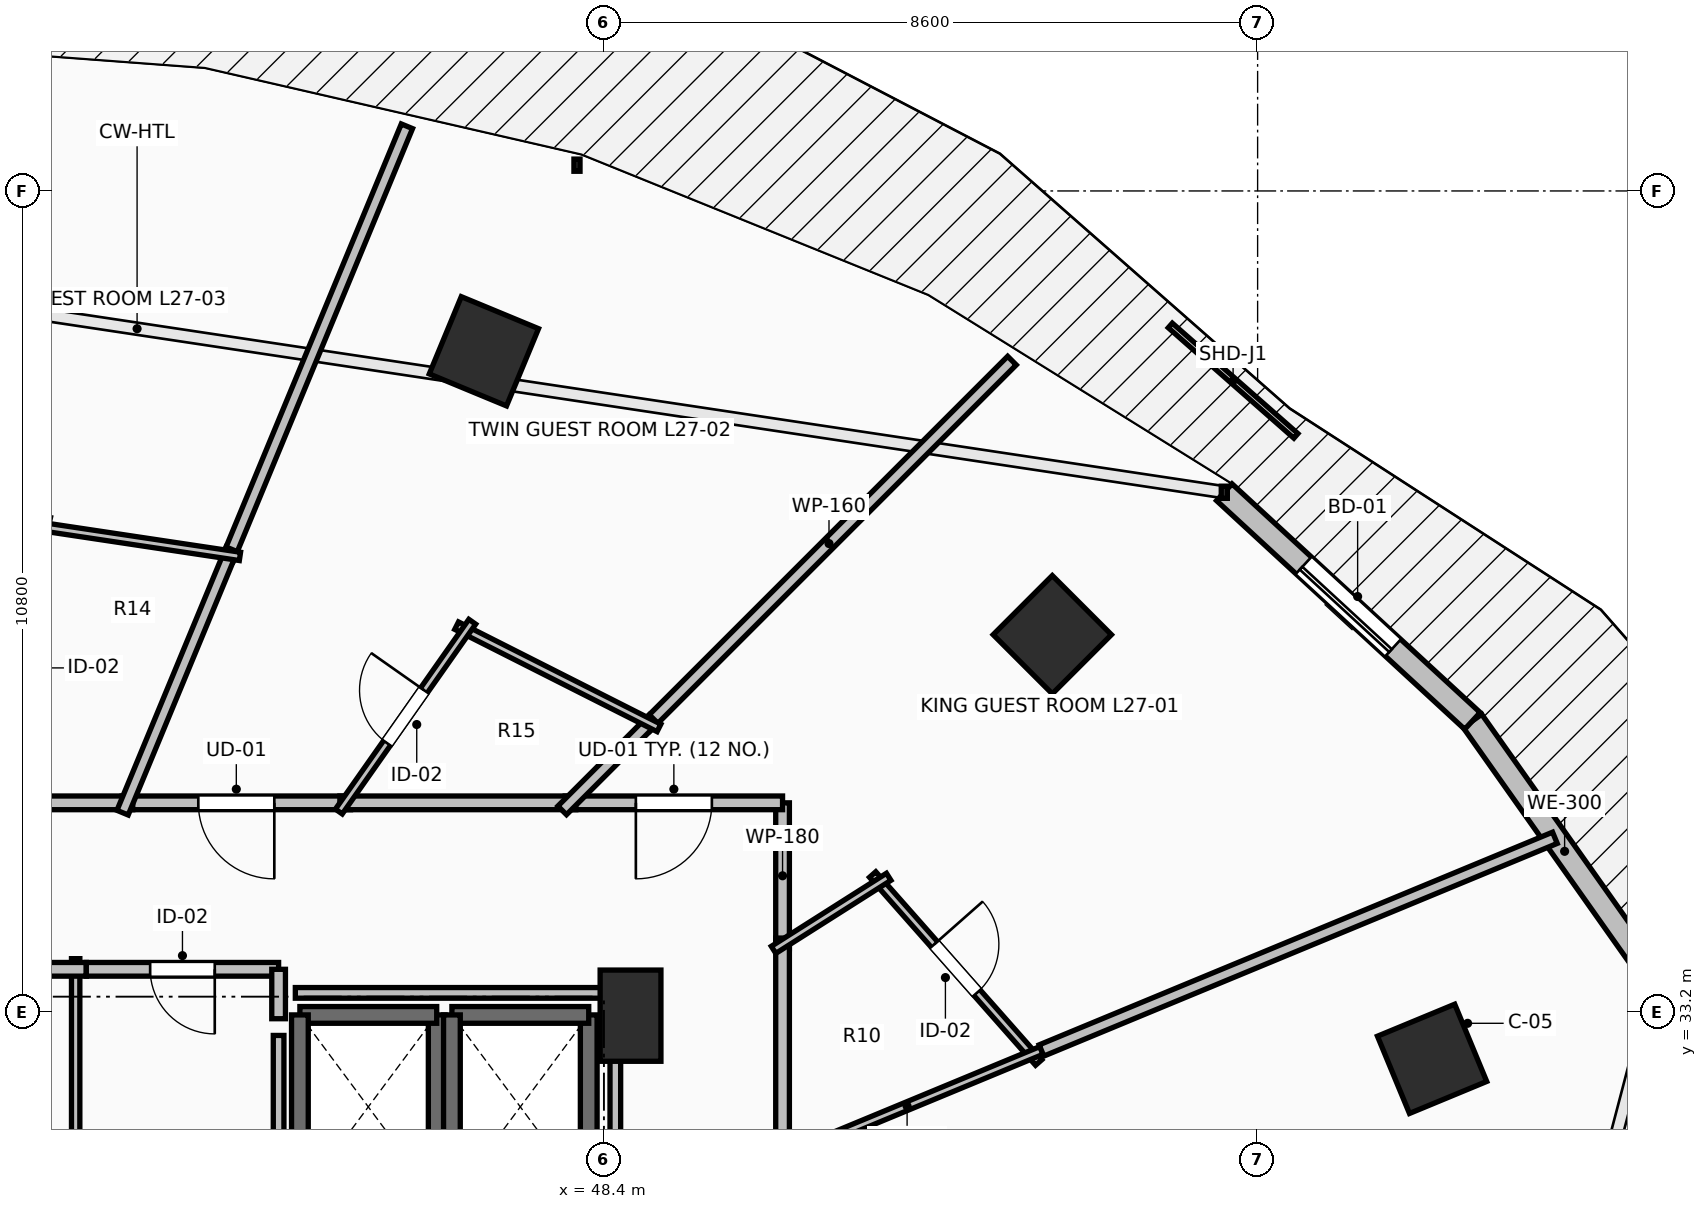
"""IFC4 building model, lengths in metres.
Left out: names, types, materials, properties, quantities, classifications, styles, units other than length and angle.
Written with IfcOpenShell. Run it as: python <this file> out.ifc"""

import sys

from ifc_helpers import new_model, si_unit, direction, frame, frame_2d, origin, origin_2d, place, context, subcontext, project, spatial, rectangle, extrude, element, fill, save


model = new_model("IFC4")
c1 = context("Model", 3, precision=1e-05, world=origin(), true_north=direction((0.0, 1.0)))
c2 = subcontext(c1, "Body", "Model", "MODEL_VIEW")
j1 = project(units=[si_unit("LENGTHUNIT", "METRE"), si_unit("PLANEANGLEUNIT", "RADIAN")], contexts=[c1])
p1 = place(None, origin())
s1 = spatial("IfcSite", under=j1, at=p1, CompositionType="ELEMENT")
p2 = place(p1, origin())
s2 = spatial("IfcBuilding", under=s1, at=p2, CompositionType="ELEMENT")
p3 = place(p2, frame((0.0, 0.0, 103.3)))
s3 = spatial("IfcBuildingStorey", under=s2, at=p3, CompositionType="ELEMENT", Elevation=103.3)
for number, where, z_axis, x_axis in (
    (1, (59.295, 32.582, 0.0), (0.0, 0.0, 1.0), (0.924, 0.383, 0.0)),
    (2, (54.299, 38.162, 0.0), (0.0, 0.0, 1.0), (0.707, 0.707, 0.0)),
    (3, (46.821, 41.891, 0.0), (0.0, 0.0, 1.0), (0.383, 0.924, 0.0)),
):
    element("IfcColumn", number, at=place(p3, frame(where, z_axis=z_axis, x_axis=x_axis)), inside=s3, PredefinedType="COLUMN", context=c2, shape_type="SweptSolid", body=[
        extrude(rectangle(XDim=1.1, YDim=1.1, at=origin_2d()), origin(), (0.0, 0.0, 1.0), 3.5),
    ])
p4 = place(p3, frame((48.75, 33.15, 0.0), z_axis=(0.0, 0.0, 1.0), x_axis=(1.0, 0.0, 0.0)))
e4 = element("IfcColumn", 4, at=p4, inside=s3, PredefinedType="PILASTER", context=c2, shape_type="SweptSolid", body=[
    extrude(rectangle(XDim=0.8, YDim=1.2, at=origin_2d()), origin(), (0.0, 0.0, 1.0), 3.5),
])
p5 = place(p3, frame((62.252, 33.596, 0.0), z_axis=(0.0, 0.0, 1.0), x_axis=(-0.57716435238, 0.81662801222, 0.0)))
e5 = element("IfcWall", 5, at=p5, inside=s3, PredefinedType="STANDARD", context=c2, shape_type="SweptSolid", body=[
    extrude(rectangle(XDim=4.202, YDim=0.3, at=frame_2d((2.101, 0.0))), origin(), (0.0, 0.0, 1.0), 3.24),
])
p6 = place(p3, frame((59.826, 37.028, 0.0), z_axis=(0.0, 0.0, 1.0), x_axis=(-0.735416718093, 0.677615119924, 0.0)))
e6 = element("IfcWall", 6, at=p6, inside=s3, PredefinedType="STANDARD", context=c2, shape_type="SweptSolid", body=[
    extrude(rectangle(XDim=4.439, YDim=0.3, at=frame_2d((2.22, 0.0))), origin(), (0.0, 0.0, 1.0), 3.24),
])
p7 = place(p6, frame((1.419, 0.0, 0.0)))
e7 = element("IfcOpeningElement", 7, at=p7, cuts=e6, PredefinedType="OPENING", context=c2, shape_type="SweptSolid", body=[
    extrude(rectangle(XDim=1.6, YDim=2.3, at=frame_2d((0.8, 1.15))), frame((0.0, 0.165, 0.0), z_axis=(0.0, -1.0, 0.0), x_axis=(1.0, 0.0, 0.0)), (0.0, 0.0, 1.0), 0.33),
])
p8 = place(p3, frame((46.2, 30.74, 0.0), z_axis=(0.0, 0.0, 1.0), x_axis=(0.0, 1.0, 0.0)))
e8 = element("IfcWall", 8, at=p8, inside=s3, PredefinedType="SOLIDWALL", context=c2, shape_type="SweptSolid", body=[
    extrude(rectangle(XDim=2.42, YDim=0.22, at=frame_2d((1.21, 0.0))), origin(), (0.0, 0.0, 1.0), 3.24),
])
p9 = place(p3, frame((46.2, 33.16, 0.0), z_axis=(0.0, 0.0, 1.0), x_axis=(-1.0, 0.0, 0.0)))
e9 = element("IfcWall", 9, at=p9, inside=s3, PredefinedType="SOLIDWALL", context=c2, shape_type="SweptSolid", body=[
    extrude(rectangle(XDim=1.8, YDim=0.22, at=frame_2d((0.9, 0.0))), origin(), (0.0, 0.0, 1.0), 3.24),
])
for number, where, z_axis, x_axis in (
    (10, (44.4, 33.16, 0.0), (0.0, 0.0, 1.0), (0.0, -1.0, 0.0)),
    (11, (48.2, 30.74, 0.0), (0.0, 0.0, 1.0), (0.0, 1.0, 0.0)),
):
    element("IfcWall", number, at=place(p3, frame(where, z_axis=z_axis, x_axis=x_axis)), inside=s3, PredefinedType="SOLIDWALL", context=c2, shape_type="SweptSolid", body=[
        extrude(rectangle(XDim=2.42, YDim=0.22, at=frame_2d((1.21, 0.0))), origin(), (0.0, 0.0, 1.0), 3.24),
    ])
p10 = place(p3, frame((48.2, 33.16, 0.0), z_axis=(0.0, 0.0, 1.0), x_axis=(-1.0, 0.0, 0.0)))
e12 = element("IfcWall", 12, at=p10, inside=s3, PredefinedType="SOLIDWALL", context=c2, shape_type="SweptSolid", body=[
    extrude(rectangle(XDim=1.8, YDim=0.22, at=frame_2d((0.9, 0.0))), origin(), (0.0, 0.0, 1.0), 3.24),
])
p11 = place(p3, frame((46.4, 33.16, 0.0), z_axis=(0.0, 0.0, 1.0), x_axis=(0.0, -1.0, 0.0)))
e13 = element("IfcWall", 13, at=p11, inside=s3, PredefinedType="SOLIDWALL", context=c2, shape_type="SweptSolid", body=[
    extrude(rectangle(XDim=2.42, YDim=0.22, at=frame_2d((1.21, 0.0))), origin(), (0.0, 0.0, 1.0), 3.24),
])
p12 = place(p3, frame((41.45, 30.34, 0.0), z_axis=(0.0, 0.0, 1.0), x_axis=(0.0, 1.0, 0.0)))
e14 = element("IfcWall", 14, at=p12, inside=s3, PredefinedType="PARTITIONING", context=c2, shape_type="SweptSolid", body=[
    extrude(rectangle(XDim=3.56, YDim=0.11, at=frame_2d((1.78, 0.0))), origin(), (0.0, 0.0, 1.0), 3.24),
])
p13 = place(p3, frame((41.59, 33.76, 0.0), z_axis=(0.0, 0.0, 1.0), x_axis=(-1.0, 0.0, 0.0)))
e15 = element("IfcWall", 15, at=p13, inside=s3, PredefinedType="PARTITIONING", context=c2, shape_type="SweptSolid", body=[
    extrude(rectangle(XDim=3.44, YDim=0.18, at=frame_2d((1.72, 0.0))), origin(), (0.0, 0.0, 1.0), 3.24),
])
p14 = place(p13, frame((1.295, 0.0, 0.0)))
e16 = element("IfcOpeningElement", 16, at=p14, cuts=e15, PredefinedType="OPENING", context=c2, shape_type="SweptSolid", body=[
    extrude(rectangle(XDim=0.85, YDim=2.1, at=frame_2d((0.425, 1.05))), frame((0.0, 0.105, 0.0), z_axis=(0.0, -1.0, 0.0), x_axis=(1.0, 0.0, 0.0)), (0.0, 0.0, 1.0), 0.21),
])
p15 = place(p3, frame((44.12, 33.76, 0.0), z_axis=(0.0, 0.0, 1.0), x_axis=(-1.0, 0.0, 0.0)))
e17 = element("IfcWall", 17, at=p15, inside=s3, PredefinedType="PARTITIONING", context=c2, shape_type="SweptSolid", body=[
    extrude(rectangle(XDim=2.53, YDim=0.18, at=frame_2d((1.265, 0.0))), origin(), (0.0, 0.0, 1.0), 3.24),
])
p16 = place(p15, frame((0.84, 0.0, 0.0)))
e18 = element("IfcOpeningElement", 18, at=p16, cuts=e17, PredefinedType="OPENING", context=c2, shape_type="SweptSolid", body=[
    extrude(rectangle(XDim=0.85, YDim=2.1, at=frame_2d((0.425, 1.05))), frame((0.0, 0.105, 0.0), z_axis=(0.0, -1.0, 0.0), x_axis=(1.0, 0.0, 0.0)), (0.0, 0.0, 1.0), 0.21),
])
p17 = place(p3, frame((44.12, 33.11, 0.0), z_axis=(0.0, 0.0, 1.0), x_axis=(0.0, 1.0, 0.0)))
e19 = element("IfcWall", 19, at=p17, inside=s3, PredefinedType="PARTITIONING", context=c2, shape_type="SweptSolid", body=[
    extrude(rectangle(XDim=0.65, YDim=0.18, at=frame_2d((0.325, 0.0))), origin(), (0.0, 0.0, 1.0), 3.24),
])
p18 = place(p3, frame((50.75, 34.031, 0.0), z_axis=(0.0, 0.0, 1.0), x_axis=(0.0, 1.0, 0.0)))
e20 = element("IfcWall", 20, at=p18, inside=s3, PredefinedType="PARTITIONING", context=c2, shape_type="SweptSolid", body=[
    extrude(rectangle(XDim=1.919, YDim=0.18, at=frame_2d((0.959, 0.0))), origin(), (0.0, 0.0, 1.0), 2.432),
])
p19 = place(p3, frame((50.75, 35.95, 0.0), z_axis=(0.0, 0.0, 1.0), x_axis=(-1.0, 0.0, 0.0)))
e21 = element("IfcWall", 21, at=p19, inside=s3, PredefinedType="PARTITIONING", context=c2, shape_type="SweptSolid", body=[
    extrude(rectangle(XDim=2.86, YDim=0.18, at=frame_2d((1.43, 0.0))), origin(), (0.0, 0.0, 1.0), 2.432),
])
p20 = place(p19, frame((0.93, 0.0, 0.0)))
e22 = element("IfcOpeningElement", 22, at=p20, cuts=e21, PredefinedType="OPENING", context=c2, shape_type="SweptSolid", body=[
    extrude(rectangle(XDim=1.0, YDim=2.15, at=frame_2d((0.5, 1.075))), frame((0.0, 0.105, 0.0), z_axis=(0.0, -1.0, 0.0), x_axis=(1.0, 0.0, 0.0)), (0.0, 0.0, 1.0), 0.21),
])
p21 = place(p3, frame((50.75, 31.081, 0.0), z_axis=(0.0, 0.0, 1.0), x_axis=(0.0, 1.0, 0.0)))
e23 = element("IfcWall", 23, at=p21, inside=s3, PredefinedType="PARTITIONING", context=c2, shape_type="SweptSolid", body=[
    extrude(rectangle(XDim=3.09, YDim=0.18, at=frame_2d((1.545, 0.0))), origin(), (0.0, 0.0, 1.0), 2.432),
])
p22 = place(p3, frame((45.066, 35.95, 0.0), z_axis=(0.0, 0.0, 1.0), x_axis=(-1.0, 0.0, 0.0)))
e24 = element("IfcWall", 24, at=p22, inside=s3, PredefinedType="PARTITIONING", context=c2, shape_type="SweptSolid", body=[
    extrude(rectangle(XDim=3.005, YDim=0.18, at=frame_2d((1.502, 0.0))), origin(), (0.0, 0.0, 1.0), 3.24),
])
p23 = place(p22, frame((1.002, 0.0, 0.0)))
e25 = element("IfcOpeningElement", 25, at=p23, cuts=e24, PredefinedType="OPENING", context=c2, shape_type="SweptSolid", body=[
    extrude(rectangle(XDim=1.0, YDim=2.15, at=frame_2d((0.5, 1.075))), frame((0.0, 0.105, 0.0), z_axis=(0.0, -1.0, 0.0), x_axis=(1.0, 0.0, 0.0)), (0.0, 0.0, 1.0), 0.21),
])
p24 = place(p3, frame((48.03, 35.95, 0.0), z_axis=(0.0, 0.0, 1.0), x_axis=(-1.0, 0.0, 0.0)))
e26 = element("IfcWall", 26, at=p24, inside=s3, PredefinedType="PARTITIONING", context=c2, shape_type="SweptSolid", body=[
    extrude(rectangle(XDim=3.104, YDim=0.18, at=frame_2d((1.552, 0.0))), origin(), (0.0, 0.0, 1.0), 2.432),
])
p25 = place(p3, frame((42.201, 35.95, 0.0), z_axis=(0.0, 0.0, 1.0), x_axis=(-1.0, 0.0, 0.0)))
e27 = element("IfcWall", 27, at=p25, inside=s3, PredefinedType="PARTITIONING", context=c2, shape_type="SweptSolid", body=[
    extrude(rectangle(XDim=2.056, YDim=0.18, at=frame_2d((1.028, 0.0))), origin(), (0.0, 0.0, 1.0), 3.24),
])
p26 = place(p3, frame((51.935, 35.007, 0.0), z_axis=(0.0, 0.0, 1.0), x_axis=(0.662059609276, -0.749451181709, 0.0)))
e28 = element("IfcWall", 28, at=p26, inside=s3, PredefinedType="PARTITIONING", context=c2, shape_type="SweptSolid", body=[
    extrude(rectangle(XDim=3.299, YDim=0.11, at=frame_2d((1.65, 0.0))), origin(), (0.0, 0.0, 1.0), 2.432),
])
p27 = place(p26, frame((1.225, 0.0, 0.0)))
e29 = element("IfcOpeningElement", 29, at=p27, cuts=e28, PredefinedType="OPENING", context=c2, shape_type="SweptSolid", body=[
    extrude(rectangle(XDim=0.85, YDim=2.1, at=frame_2d((0.425, 1.05))), frame((0.0, 0.07, 0.0), z_axis=(0.0, -1.0, 0.0), x_axis=(1.0, 0.0, 0.0)), (0.0, 0.0, 1.0), 0.14),
])
p28 = place(p3, frame((54.156, 32.693, 0.0), z_axis=(0.0, 0.0, 1.0), x_axis=(-0.923803754276, -0.382866326002, 0.0)))
e30 = element("IfcWall", 30, at=p28, inside=s3, PredefinedType="PARTITIONING", context=c2, shape_type="SweptSolid", body=[
    extrude(rectangle(XDim=3.827, YDim=0.11, at=frame_2d((1.914, 0.0))), origin(), (0.0, 0.0, 1.0), 2.432),
])
p29 = place(p3, frame((50.632, 34.016, 0.0), z_axis=(0.0, 0.0, 1.0), x_axis=(0.844361394482, 0.535774052665, 0.0)))
e31 = element("IfcWall", 31, at=p29, inside=s3, PredefinedType="PARTITIONING", context=c2, shape_type="SweptSolid", body=[
    extrude(rectangle(XDim=1.793, YDim=0.11, at=frame_2d((0.897, 0.0))), origin(), (0.0, 0.0, 1.0), 2.886),
])
p30 = place(p3, frame((53.768, 41.768, 0.0), z_axis=(0.0, 0.0, 1.0), x_axis=(-0.707106781187, -0.707106781187, 0.0)))
e32 = element("IfcWall", 32, at=p30, inside=s3, PredefinedType="PARTITIONING", context=c2, shape_type="SweptSolid", body=[
    extrude(rectangle(XDim=6.808, YDim=0.16, at=frame_2d((3.404, 0.0))), origin(), (0.0, 0.0, 1.0), 2.677),
])
p31 = place(p3, frame((49.053, 37.053, 0.0), z_axis=(0.0, 0.0, 1.0), x_axis=(-0.707106781187, -0.707106781187, 0.0)))
e33 = element("IfcWall", 33, at=p31, inside=s3, PredefinedType="PARTITIONING", context=c2, shape_type="SweptSolid", body=[
    extrude(rectangle(XDim=1.7, YDim=0.16, at=frame_2d((0.85, 0.0))), origin(), (0.0, 0.0, 1.0), 2.432),
])
p32 = place(p3, frame((54.156, 32.692, 0.0), z_axis=(0.0, 0.0, 1.0), x_axis=(0.923875192571, 0.38269390974, 0.0)))
e34 = element("IfcWall", 34, at=p32, inside=s3, PredefinedType="PARTITIONING", context=c2, shape_type="SweptSolid", body=[
    extrude(rectangle(XDim=7.311, YDim=0.16, at=frame_2d((3.656, 0.0))), origin(), (0.0, 0.0, 1.0), 2.432),
])
p33 = place(p3, frame((46.462, 38.281, 0.0), z_axis=(0.0, 0.0, 1.0), x_axis=(0.892486842203, -0.451073426944, 0.0)))
e35 = element("IfcWall", 35, at=p33, inside=s3, PredefinedType="PARTITIONING", context=c2, shape_type="SweptSolid", body=[
    extrude(rectangle(XDim=2.982, YDim=0.11, at=frame_2d((1.491, 0.0))), origin(), (0.0, 0.0, 1.0), 2.432),
])
p34 = place(p3, frame((44.913, 35.835, 0.0), z_axis=(0.0, 0.0, 1.0), x_axis=(0.574986040322, 0.818163219312, 0.0)))
e36 = element("IfcWall", 36, at=p34, inside=s3, PredefinedType="PARTITIONING", context=c2, shape_type="SweptSolid", body=[
    extrude(rectangle(XDim=3.052, YDim=0.11, at=frame_2d((1.526, 0.0))), origin(), (0.0, 0.0, 1.0), 2.886),
])
p35 = place(p34, frame((1.101, 0.0, 0.0)))
e37 = element("IfcOpeningElement", 37, at=p35, cuts=e36, PredefinedType="OPENING", context=c2, shape_type="SweptSolid", body=[
    extrude(rectangle(XDim=0.85, YDim=2.1, at=frame_2d((0.425, 1.05))), frame((0.0, 0.07, 0.0), z_axis=(0.0, -1.0, 0.0), x_axis=(1.0, 0.0, 0.0)), (0.0, 0.0, 1.0), 0.14),
])
p36 = place(p3, frame((45.808, 44.851, 0.0), z_axis=(0.0, 0.0, 1.0), x_axis=(-0.382705075352, -0.923870567395, 0.0)))
e38 = element("IfcWall", 38, at=p36, inside=s3, PredefinedType="PARTITIONING", context=c2, shape_type="SweptSolid", body=[
    extrude(rectangle(XDim=6.164, YDim=0.16, at=frame_2d((3.082, 0.0))), origin(), (0.0, 0.0, 1.0), 2.677),
])
p37 = place(p3, frame((43.503, 39.285, 0.0), z_axis=(0.0, 0.0, 1.0), x_axis=(-0.382733183699, -0.923858923265, 0.0)))
e39 = element("IfcWall", 39, at=p37, inside=s3, PredefinedType="PARTITIONING", context=c2, shape_type="SweptSolid", body=[
    extrude(rectangle(XDim=3.75, YDim=0.16, at=frame_2d((1.875, 0.0))), origin(), (0.0, 0.0, 1.0), 2.886),
])
p38 = place(p3, frame((40.896, 39.6, 0.0), z_axis=(0.0, 0.0, 1.0), x_axis=(0.98891024541, -0.148514398367, 0.0)))
e40 = element("IfcWall", 40, at=p38, inside=s3, PredefinedType="PARTITIONING", context=c2, shape_type="SweptSolid", body=[
    extrude(rectangle(XDim=2.745, YDim=0.11, at=frame_2d((1.373, 0.0))), origin(), (0.0, 0.0, 1.0), 2.972),
])
p39 = place(p3, frame((44.12, 30.48, 0.0), z_axis=(0.0, 0.0, 1.0), x_axis=(0.0, 1.0, 0.0)))
e41 = element("IfcWall", 41, at=p39, inside=s3, PredefinedType="PARTITIONING", context=c2, shape_type="SweptSolid", body=[
    extrude(rectangle(XDim=2.41, YDim=0.14, at=frame_2d((1.205, 0.0))), origin(), (0.0, 0.0, 1.0), 3.24),
])
p40 = place(p3, frame((44.34, 33.45, 0.0), z_axis=(0.0, 0.0, 1.0), x_axis=(1.0, 0.0, 0.0)))
e42 = element("IfcWall", 42, at=p40, inside=s3, PredefinedType="PARTITIONING", context=c2, shape_type="SweptSolid", body=[
    extrude(rectangle(XDim=4.21, YDim=0.14, at=frame_2d((2.105, 0.0))), origin(), (0.0, 0.0, 1.0), 2.432),
])
p41 = place(p3, frame((48.55, 33.45, 0.0), z_axis=(0.0, 0.0, 1.0), x_axis=(0.0, -1.0, 0.0)))
e43 = element("IfcWall", 43, at=p41, inside=s3, PredefinedType="PARTITIONING", context=c2, shape_type="SweptSolid", body=[
    extrude(rectangle(XDim=5.254, YDim=0.14, at=frame_2d((2.627, 0.0))), origin(), (0.0, 0.0, 1.0), 2.432),
])
p42 = place(p7, origin())
e44 = element("IfcDoor", 44, at=p42, inside=s3, OperationType="SLIDING_TO_LEFT", PredefinedType="DOOR", context=c2, shape_type="SweptSolid", body=[
    extrude(rectangle(XDim=1.6, YDim=2.3, at=frame_2d((0.8, 1.15))), frame((0.0, 0.025, 0.0), z_axis=(0.0, -1.0, 0.0), x_axis=(1.0, 0.0, 0.0)), (0.0, 0.0, 1.0), 0.05),
])
fill(e7, e44)
p43 = place(p16, origin())
e45 = element("IfcDoor", 45, at=p43, inside=s3, OperationType="SINGLE_SWING_LEFT", PredefinedType="DOOR", context=c2, shape_type="SweptSolid", body=[
    extrude(rectangle(XDim=0.85, YDim=2.1, at=frame_2d((0.425, 1.05))), frame((0.0, 0.025, 0.0), z_axis=(0.0, -1.0, 0.0), x_axis=(1.0, 0.0, 0.0)), (0.0, 0.0, 1.0), 0.05),
])
fill(e18, e45)
p44 = place(p20, origin())
e46 = element("IfcDoor", 46, at=p44, inside=s3, OperationType="SINGLE_SWING_RIGHT", PredefinedType="DOOR", context=c2, shape_type="SweptSolid", body=[
    extrude(rectangle(XDim=1.0, YDim=2.15, at=frame_2d((0.5, 1.075))), frame((0.0, 0.025, 0.0), z_axis=(0.0, -1.0, 0.0), x_axis=(1.0, 0.0, 0.0)), (0.0, 0.0, 1.0), 0.05),
])
fill(e22, e46)
p45 = place(p23, origin())
e47 = element("IfcDoor", 47, at=p45, inside=s3, OperationType="SINGLE_SWING_LEFT", PredefinedType="DOOR", context=c2, shape_type="SweptSolid", body=[
    extrude(rectangle(XDim=1.0, YDim=2.15, at=frame_2d((0.5, 1.075))), frame((0.0, 0.025, 0.0), z_axis=(0.0, -1.0, 0.0), x_axis=(1.0, 0.0, 0.0)), (0.0, 0.0, 1.0), 0.05),
])
fill(e25, e47)
p46 = place(p27, origin())
e48 = element("IfcDoor", 48, at=p46, inside=s3, OperationType="SINGLE_SWING_LEFT", PredefinedType="DOOR", context=c2, shape_type="SweptSolid", body=[
    extrude(rectangle(XDim=0.85, YDim=2.1, at=frame_2d((0.425, 1.05))), frame((0.0, 0.025, 0.0), z_axis=(0.0, -1.0, 0.0), x_axis=(1.0, 0.0, 0.0)), (0.0, 0.0, 1.0), 0.05),
])
fill(e29, e48)
p47 = place(p35, origin())
e49 = element("IfcDoor", 49, at=p47, inside=s3, OperationType="SINGLE_SWING_RIGHT", PredefinedType="DOOR", context=c2, shape_type="SweptSolid", body=[
    extrude(rectangle(XDim=0.85, YDim=2.1, at=frame_2d((0.425, 1.05))), frame((0.0, 0.025, 0.0), z_axis=(0.0, -1.0, 0.0), x_axis=(1.0, 0.0, 0.0)), (0.0, 0.0, 1.0), 0.05),
])
fill(e37, e49)
save(model, sys.argv[1])
